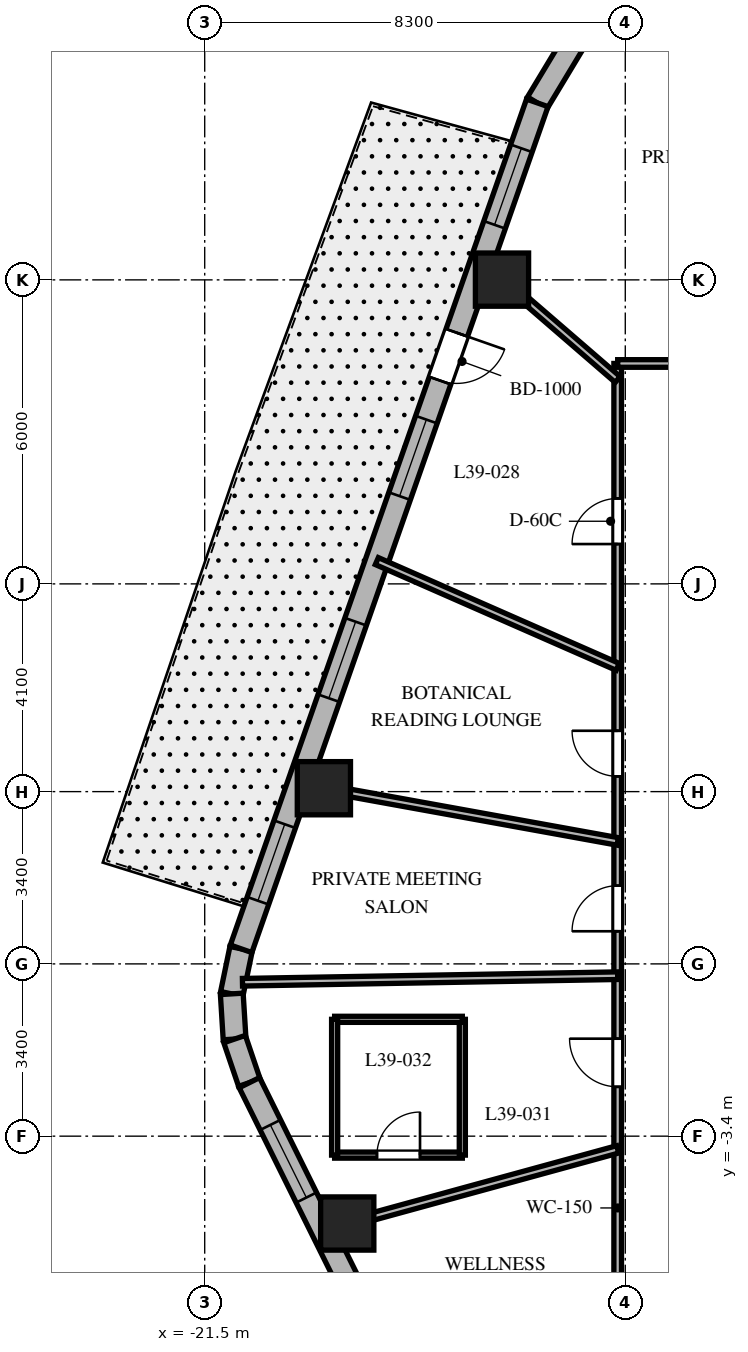
"""IFC4 building model, lengths in metres.
Left out: names, types, materials, properties, quantities, classifications, styles, units other than length and angle.
Written with IfcOpenShell. Run it as: python <this file> out.ifc"""

import sys

from ifc_helpers import new_model, si_unit, direction, frame, frame_2d, origin, origin_2d, place, context, subcontext, project, spatial, rectangle, extrude, element, fill, save


model = new_model("IFC4")
c1 = context("Model", 3, precision=1e-05, world=origin(), true_north=direction((0.0, 1.0)))
c2 = subcontext(c1, "Body", "Model", "MODEL_VIEW")
j1 = project(units=[si_unit("LENGTHUNIT", "METRE"), si_unit("PLANEANGLEUNIT", "RADIAN")], contexts=[c1])
p1 = place(None, origin())
s1 = spatial("IfcSite", under=j1, at=p1, CompositionType="ELEMENT")
p2 = place(p1, origin())
s2 = spatial("IfcBuilding", under=s1, at=p2, CompositionType="ELEMENT")
p3 = place(p2, frame((0.0, 0.0, 159.1)))
s3 = spatial("IfcBuildingStorey", under=s2, at=p3, CompositionType="ELEMENT", Elevation=159.1)
for number, where, z_axis, x_axis in (
    (1, (-15.633, 13.505, 0.0), (0.0, 0.0, 1.0), (1.0, 0.0, 0.0)),
    (2, (-19.148, 3.467, 0.0), (0.0, 0.0, 1.0), (1.0, 0.0, 0.0)),
    (3, (-18.687, -5.124, 0.0), (0.0, 0.0, 1.0), (1.0, 0.0, 0.0)),
):
    element("IfcColumn", number, at=place(p3, frame(where, z_axis=z_axis, x_axis=x_axis)), inside=s3, PredefinedType="COLUMN", context=c2, shape_type="SweptSolid", body=[
        extrude(rectangle(XDim=1.05, YDim=1.05, at=origin_2d()), origin(), (0.0, 0.0, 1.0), 3.7),
    ])
p4 = place(p3, frame((-14.214, 18.192, 0.0), z_axis=(0.0, 0.0, 1.0), x_axis=(-0.516340945502, -0.856383108193, 0.0)))
e4 = element("IfcWall", 4, at=p4, inside=s3, PredefinedType="SOLIDWALL", context=c2, shape_type="SweptSolid", body=[
    extrude(rectangle(XDim=1.4, YDim=0.45, at=frame_2d((0.7, 0.0))), origin(), (0.0, 0.0, 1.0), 3.4),
])
p5 = place(p3, frame((-20.782, 0.298, 0.0), z_axis=(0.0, 0.0, 1.0), x_axis=(-0.202570068411, -0.979267771033, 0.0)))
e5 = element("IfcWall", 5, at=p5, inside=s3, PredefinedType="SOLIDWALL", context=c2, shape_type="SweptSolid", body=[
    extrude(rectangle(XDim=0.909, YDim=0.45, at=frame_2d((0.454, 0.0))), origin(), (0.0, 0.0, 1.0), 3.4),
])
p6 = place(p3, frame((-20.966, -0.592, 0.0), z_axis=(0.0, 0.0, 1.0), x_axis=(0.061748898935, -0.998091715966, 0.0)))
e6 = element("IfcWall", 6, at=p6, inside=s3, PredefinedType="SOLIDWALL", context=c2, shape_type="SweptSolid", body=[
    extrude(rectangle(XDim=0.894, YDim=0.45, at=frame_2d((0.447, 0.0))), origin(), (0.0, 0.0, 1.0), 3.4),
])
p7 = place(p3, frame((-20.911, -1.484, 0.0), z_axis=(0.0, 0.0, 1.0), x_axis=(0.321623334353, -0.946867694453, 0.0)))
e7 = element("IfcWall", 7, at=p7, inside=s3, PredefinedType="SOLIDWALL", context=c2, shape_type="SweptSolid", body=[
    extrude(rectangle(XDim=0.909, YDim=0.45, at=frame_2d((0.454, 0.0))), origin(), (0.0, 0.0, 1.0), 3.4),
])
p8 = place(p3, frame((-14.937, 16.993, 0.0), z_axis=(0.0, 0.0, 1.0), x_axis=(-0.330431575061, -0.943829949834, 0.0)))
e8 = element("IfcWall", 8, at=p8, inside=s3, PredefinedType="SOLIDWALL", context=c2, shape_type="SweptSolid", body=[
    extrude(rectangle(XDim=17.689, YDim=0.45, at=frame_2d((8.844, 0.0))), origin(), (0.0, 0.0, 1.0), 3.4),
])
p9 = place(p8, frame((4.807, 0.0, 0.0)))
e9 = element("IfcOpeningElement", 9, at=p9, cuts=e8, PredefinedType="OPENING", context=c2, shape_type="SweptSolid", body=[
    extrude(rectangle(XDim=1.0, YDim=2.15, at=frame_2d((0.5, 1.075))), frame((0.0, 0.235, 0.0), z_axis=(0.0, -1.0, 0.0), x_axis=(1.0, 0.0, 0.0)), (0.0, 0.0, 1.0), 0.47),
])
p10 = place(p8, frame((0.95, 0.0, 0.8)))
e10 = element("IfcOpeningElement", 10, at=p10, cuts=e8, PredefinedType="OPENING", context=c2, shape_type="SweptSolid", body=[
    extrude(rectangle(XDim=1.6, YDim=1.75, at=frame_2d((0.8, 0.875))), frame((0.0, 0.235, 0.0), z_axis=(0.0, -1.0, 0.0), x_axis=(1.0, 0.0, 0.0)), (0.0, 0.0, 1.0), 0.47),
])
p11 = place(p8, frame((6.623, 0.0, 0.8)))
e11 = element("IfcOpeningElement", 11, at=p11, cuts=e8, PredefinedType="OPENING", context=c2, shape_type="SweptSolid", body=[
    extrude(rectangle(XDim=1.6, YDim=1.75, at=frame_2d((0.8, 0.875))), frame((0.0, 0.235, 0.0), z_axis=(0.0, -1.0, 0.0), x_axis=(1.0, 0.0, 0.0)), (0.0, 0.0, 1.0), 0.47),
])
p12 = place(p8, frame((10.849, 0.0, 0.8)))
e12 = element("IfcOpeningElement", 12, at=p12, cuts=e8, PredefinedType="OPENING", context=c2, shape_type="SweptSolid", body=[
    extrude(rectangle(XDim=1.6, YDim=1.75, at=frame_2d((0.8, 0.875))), frame((0.0, 0.235, 0.0), z_axis=(0.0, -1.0, 0.0), x_axis=(1.0, 0.0, 0.0)), (0.0, 0.0, 1.0), 0.47),
])
p13 = place(p8, frame((15.084, 0.0, 0.8)))
e13 = element("IfcOpeningElement", 13, at=p13, cuts=e8, PredefinedType="OPENING", context=c2, shape_type="SweptSolid", body=[
    extrude(rectangle(XDim=1.6, YDim=1.75, at=frame_2d((0.8, 0.875))), frame((0.0, 0.235, 0.0), z_axis=(0.0, -1.0, 0.0), x_axis=(1.0, 0.0, 0.0)), (0.0, 0.0, 1.0), 0.47),
])
p14 = place(p3, frame((-20.618, -2.344, 0.0), z_axis=(0.0, 0.0, 1.0), x_axis=(0.444243691097, -0.895905990002, 0.0)))
e14 = element("IfcWall", 14, at=p14, inside=s3, PredefinedType="SOLIDWALL", context=c2, shape_type="SweptSolid", body=[
    extrude(rectangle(XDim=16.784, YDim=0.45, at=frame_2d((8.392, 0.0))), origin(), (0.0, 0.0, 1.0), 3.4),
])
p15 = place(p14, frame((0.931, 0.0, 0.8)))
e15 = element("IfcOpeningElement", 15, at=p15, cuts=e14, PredefinedType="OPENING", context=c2, shape_type="SweptSolid", body=[
    extrude(rectangle(XDim=1.6, YDim=1.75, at=frame_2d((0.8, 0.875))), frame((0.0, 0.235, 0.0), z_axis=(0.0, -1.0, 0.0), x_axis=(1.0, 0.0, 0.0)), (0.0, 0.0, 1.0), 0.47),
])
p16 = place(p14, frame((7.642, 0.0, 0.8)))
e16 = element("IfcOpeningElement", 16, at=p16, cuts=e14, PredefinedType="OPENING", context=c2, shape_type="SweptSolid", body=[
    extrude(rectangle(XDim=1.6, YDim=1.75, at=frame_2d((0.8, 0.875))), frame((0.0, 0.235, 0.0), z_axis=(0.0, -1.0, 0.0), x_axis=(1.0, 0.0, 0.0)), (0.0, 0.0, 1.0), 0.47),
])
p17 = place(p14, frame((14.303, 0.0, 0.8)))
e17 = element("IfcOpeningElement", 17, at=p17, cuts=e14, PredefinedType="OPENING", context=c2, shape_type="SweptSolid", body=[
    extrude(rectangle(XDim=1.6, YDim=1.75, at=frame_2d((0.8, 0.875))), frame((0.0, 0.235, 0.0), z_axis=(0.0, -1.0, 0.0), x_axis=(1.0, 0.0, 0.0)), (0.0, 0.0, 1.0), 0.47),
])
p18 = place(p3, frame((-13.35, -11.85, 0.0), z_axis=(0.0, 0.0, 1.0), x_axis=(0.0, 1.0, 0.0)))
e18 = element("IfcWall", 18, at=p18, inside=s3, PredefinedType="PARTITIONING", context=c2, shape_type="SweptSolid", body=[
    extrude(rectangle(XDim=23.7, YDim=0.15, at=frame_2d((11.85, 0.0))), origin(), (0.0, 0.0, 1.0), 2.84),
])
p19 = place(p18, frame((20.136, 0.0, 0.0)))
e19 = element("IfcOpeningElement", 19, at=p19, cuts=e18, PredefinedType="OPENING", context=c2, shape_type="SweptSolid", body=[
    extrude(rectangle(XDim=0.9, YDim=2.03, at=frame_2d((0.45, 1.015))), frame((0.0, 0.085, 0.0), z_axis=(0.0, -1.0, 0.0), x_axis=(1.0, 0.0, 0.0)), (0.0, 0.0, 1.0), 0.17),
])
p20 = place(p18, frame((15.551, 0.0, 0.0)))
e20 = element("IfcOpeningElement", 20, at=p20, cuts=e18, PredefinedType="OPENING", context=c2, shape_type="SweptSolid", body=[
    extrude(rectangle(XDim=0.9, YDim=2.03, at=frame_2d((0.45, 1.015))), frame((0.0, 0.085, 0.0), z_axis=(0.0, -1.0, 0.0), x_axis=(1.0, 0.0, 0.0)), (0.0, 0.0, 1.0), 0.17),
])
p21 = place(p18, frame((12.494, 0.0, 0.0)))
e21 = element("IfcOpeningElement", 21, at=p21, cuts=e18, PredefinedType="OPENING", context=c2, shape_type="SweptSolid", body=[
    extrude(rectangle(XDim=0.9, YDim=2.03, at=frame_2d((0.45, 1.015))), frame((0.0, 0.085, 0.0), z_axis=(0.0, -1.0, 0.0), x_axis=(1.0, 0.0, 0.0)), (0.0, 0.0, 1.0), 0.17),
])
p22 = place(p18, frame((9.424, 0.0, 0.0)))
e22 = element("IfcOpeningElement", 22, at=p22, cuts=e18, PredefinedType="OPENING", context=c2, shape_type="SweptSolid", body=[
    extrude(rectangle(XDim=0.95, YDim=2.03, at=frame_2d((0.475, 1.015))), frame((0.0, 0.085, 0.0), z_axis=(0.0, -1.0, 0.0), x_axis=(1.0, 0.0, 0.0)), (0.0, 0.0, 1.0), 0.17),
])
p23 = place(p18, frame((3.765, 0.0, 0.0)))
e23 = element("IfcOpeningElement", 23, at=p23, cuts=e18, PredefinedType="OPENING", context=c2, shape_type="SweptSolid", body=[
    extrude(rectangle(XDim=0.9, YDim=2.03, at=frame_2d((0.45, 1.015))), frame((0.0, 0.085, 0.0), z_axis=(0.0, -1.0, 0.0), x_axis=(1.0, 0.0, 0.0)), (0.0, 0.0, 1.0), 0.17),
])
p24 = place(p3, frame((-13.35, 11.85, 0.0), z_axis=(0.0, 0.0, 1.0), x_axis=(1.0, 0.0, 0.0)))
e24 = element("IfcWall", 24, at=p24, inside=s3, PredefinedType="PARTITIONING", context=c2, shape_type="SweptSolid", body=[
    extrude(rectangle(XDim=26.7, YDim=0.15, at=frame_2d((13.35, 0.0))), origin(), (0.0, 0.0, 1.0), 2.84),
])
p25 = place(p24, frame((20.682, 0.0, 0.0)))
e25 = element("IfcOpeningElement", 25, at=p25, cuts=e24, PredefinedType="OPENING", context=c2, shape_type="SweptSolid", body=[
    extrude(rectangle(XDim=0.95, YDim=2.03, at=frame_2d((0.475, 1.015))), frame((0.0, 0.085, 0.0), z_axis=(0.0, -1.0, 0.0), x_axis=(1.0, 0.0, 0.0)), (0.0, 0.0, 1.0), 0.17),
])
p26 = place(p24, frame((14.708, 0.0, 0.0)))
e26 = element("IfcOpeningElement", 26, at=p26, cuts=e24, PredefinedType="OPENING", context=c2, shape_type="SweptSolid", body=[
    extrude(rectangle(XDim=0.95, YDim=2.03, at=frame_2d((0.475, 1.015))), frame((0.0, 0.085, 0.0), z_axis=(0.0, -1.0, 0.0), x_axis=(1.0, 0.0, 0.0)), (0.0, 0.0, 1.0), 0.17),
])
p27 = place(p24, frame((10.553, 0.0, 0.0)))
e27 = element("IfcOpeningElement", 27, at=p27, cuts=e24, PredefinedType="OPENING", context=c2, shape_type="SweptSolid", body=[
    extrude(rectangle(XDim=0.95, YDim=2.03, at=frame_2d((0.475, 1.015))), frame((0.0, 0.085, 0.0), z_axis=(0.0, -1.0, 0.0), x_axis=(1.0, 0.0, 0.0)), (0.0, 0.0, 1.0), 0.17),
])
p28 = place(p24, frame((3.995, 0.0, 0.0)))
e28 = element("IfcOpeningElement", 28, at=p28, cuts=e24, PredefinedType="OPENING", context=c2, shape_type="SweptSolid", body=[
    extrude(rectangle(XDim=0.95, YDim=2.03, at=frame_2d((0.475, 1.015))), frame((0.0, 0.085, 0.0), z_axis=(0.0, -1.0, 0.0), x_axis=(1.0, 0.0, 0.0)), (0.0, 0.0, 1.0), 0.17),
])
p29 = place(p3, frame((-13.35, 11.533, 0.0), z_axis=(0.0, 0.0, 1.0), x_axis=(-0.756711647314, 0.65374879183, 0.0)))
e29 = element("IfcWall", 29, at=p29, inside=s3, PredefinedType="PARTITIONING", context=c2, shape_type="SweptSolid", body=[
    extrude(rectangle(XDim=3.55, YDim=0.15, at=frame_2d((1.775, 0.0))), origin(), (0.0, 0.0, 1.0), 2.64),
])
p30 = place(p3, frame((-13.35, 5.863, 0.0), z_axis=(0.0, 0.0, 1.0), x_axis=(-0.9155832175, 0.402128551376, 0.0)))
e30 = element("IfcWall", 30, at=p30, inside=s3, PredefinedType="PARTITIONING", context=c2, shape_type="SweptSolid", body=[
    extrude(rectangle(XDim=5.191, YDim=0.15, at=frame_2d((2.595, 0.0))), origin(), (0.0, 0.0, 1.0), 2.64),
])
p31 = place(p3, frame((-13.35, 2.417, 0.0), z_axis=(0.0, 0.0, 1.0), x_axis=(-0.98399796473, 0.178179699761, 0.0)))
e31 = element("IfcWall", 31, at=p31, inside=s3, PredefinedType="PARTITIONING", context=c2, shape_type="SweptSolid", body=[
    extrude(rectangle(XDim=6.393, YDim=0.15, at=frame_2d((3.197, 0.0))), origin(), (0.0, 0.0, 1.0), 2.64),
])
p32 = place(p3, frame((-13.35, -0.233, 0.0), z_axis=(0.0, 0.0, 1.0), x_axis=(-0.999847932133, -0.017438824797, 0.0)))
e32 = element("IfcWall", 32, at=p32, inside=s3, PredefinedType="PARTITIONING", context=c2, shape_type="SweptSolid", body=[
    extrude(rectangle(XDim=7.406, YDim=0.15, at=frame_2d((3.703, 0.0))), origin(), (0.0, 0.0, 1.0), 2.64),
])
p33 = place(p3, frame((-13.35, -3.661, 0.0), z_axis=(0.0, 0.0, 1.0), x_axis=(-0.964397145454, -0.264458211898, 0.0)))
e33 = element("IfcWall", 33, at=p33, inside=s3, PredefinedType="PARTITIONING", context=c2, shape_type="SweptSolid", body=[
    extrude(rectangle(XDim=6.039, YDim=0.15, at=frame_2d((3.019, 0.0))), origin(), (0.0, 0.0, 1.0), 2.64),
])
p34 = place(p3, frame((-18.936, -3.774, 0.0), z_axis=(0.0, 0.0, 1.0), x_axis=(1.0, 0.0, 0.0)))
e34 = element("IfcWall", 34, at=p34, inside=s3, PredefinedType="PARTITIONING", context=c2, shape_type="SweptSolid", body=[
    extrude(rectangle(XDim=2.52, YDim=0.12, at=frame_2d((1.26, 0.0))), origin(), (0.0, 0.0, 1.0), 2.64),
])
p35 = place(p34, frame((0.835, 0.0, 0.0)))
e35 = element("IfcOpeningElement", 35, at=p35, cuts=e34, PredefinedType="OPENING", context=c2, shape_type="SweptSolid", body=[
    extrude(rectangle(XDim=0.85, YDim=2.03, at=frame_2d((0.425, 1.015))), frame((0.0, 0.07, 0.0), z_axis=(0.0, -1.0, 0.0), x_axis=(1.0, 0.0, 0.0)), (0.0, 0.0, 1.0), 0.14),
])
p36 = place(p3, frame((-16.416, -3.774, 0.0), z_axis=(0.0, 0.0, 1.0), x_axis=(0.0, 1.0, 0.0)))
e36 = element("IfcWall", 36, at=p36, inside=s3, PredefinedType="PARTITIONING", context=c2, shape_type="SweptSolid", body=[
    extrude(rectangle(XDim=2.68, YDim=0.12, at=frame_2d((1.34, 0.0))), origin(), (0.0, 0.0, 1.0), 3.4),
])
p37 = place(p3, frame((-16.416, -1.094, 0.0), z_axis=(0.0, 0.0, 1.0), x_axis=(-1.0, 0.0, 0.0)))
e37 = element("IfcWall", 37, at=p37, inside=s3, PredefinedType="PARTITIONING", context=c2, shape_type="SweptSolid", body=[
    extrude(rectangle(XDim=2.52, YDim=0.12, at=frame_2d((1.26, 0.0))), origin(), (0.0, 0.0, 1.0), 2.64),
])
p38 = place(p3, frame((-18.936, -1.094, 0.0), z_axis=(0.0, 0.0, 1.0), x_axis=(0.0, -1.0, 0.0)))
e38 = element("IfcWall", 38, at=p38, inside=s3, PredefinedType="PARTITIONING", context=c2, shape_type="SweptSolid", body=[
    extrude(rectangle(XDim=2.68, YDim=0.12, at=frame_2d((1.34, 0.0))), origin(), (0.0, 0.0, 1.0), 2.64),
])
p39 = place(p9, origin())
e39 = element("IfcDoor", 39, at=p39, inside=s3, OperationType="SINGLE_SWING_LEFT", PredefinedType="DOOR", context=c2, shape_type="SweptSolid", body=[
    extrude(rectangle(XDim=1.0, YDim=2.15, at=frame_2d((0.5, 1.075))), frame((0.0, 0.025, 0.0), z_axis=(0.0, -1.0, 0.0), x_axis=(1.0, 0.0, 0.0)), (0.0, 0.0, 1.0), 0.05),
])
fill(e9, e39)
p40 = place(p10, origin())
e40 = element("IfcWindow", 40, at=p40, inside=s3, PartitioningType="SINGLE_PANEL", PredefinedType="WINDOW", context=c2, shape_type="SweptSolid", body=[
    extrude(rectangle(XDim=1.6, YDim=1.75, at=frame_2d((0.8, 0.875))), frame((0.0, 0.03, 0.0), z_axis=(0.0, -1.0, 0.0), x_axis=(1.0, 0.0, 0.0)), (0.0, 0.0, 1.0), 0.06),
])
fill(e10, e40)
p41 = place(p11, origin())
e41 = element("IfcWindow", 41, at=p41, inside=s3, PartitioningType="SINGLE_PANEL", PredefinedType="WINDOW", context=c2, shape_type="SweptSolid", body=[
    extrude(rectangle(XDim=1.6, YDim=1.75, at=frame_2d((0.8, 0.875))), frame((0.0, 0.03, 0.0), z_axis=(0.0, -1.0, 0.0), x_axis=(1.0, 0.0, 0.0)), (0.0, 0.0, 1.0), 0.06),
])
fill(e11, e41)
p42 = place(p12, origin())
e42 = element("IfcWindow", 42, at=p42, inside=s3, PartitioningType="SINGLE_PANEL", PredefinedType="WINDOW", context=c2, shape_type="SweptSolid", body=[
    extrude(rectangle(XDim=1.6, YDim=1.75, at=frame_2d((0.8, 0.875))), frame((0.0, 0.03, 0.0), z_axis=(0.0, -1.0, 0.0), x_axis=(1.0, 0.0, 0.0)), (0.0, 0.0, 1.0), 0.06),
])
fill(e12, e42)
p43 = place(p13, origin())
e43 = element("IfcWindow", 43, at=p43, inside=s3, PartitioningType="SINGLE_PANEL", PredefinedType="WINDOW", context=c2, shape_type="SweptSolid", body=[
    extrude(rectangle(XDim=1.6, YDim=1.75, at=frame_2d((0.8, 0.875))), frame((0.0, 0.03, 0.0), z_axis=(0.0, -1.0, 0.0), x_axis=(1.0, 0.0, 0.0)), (0.0, 0.0, 1.0), 0.06),
])
fill(e13, e43)
p44 = place(p15, origin())
e44 = element("IfcWindow", 44, at=p44, inside=s3, PartitioningType="SINGLE_PANEL", PredefinedType="WINDOW", context=c2, shape_type="SweptSolid", body=[
    extrude(rectangle(XDim=1.6, YDim=1.75, at=frame_2d((0.8, 0.875))), frame((0.0, 0.03, 0.0), z_axis=(0.0, -1.0, 0.0), x_axis=(1.0, 0.0, 0.0)), (0.0, 0.0, 1.0), 0.06),
])
fill(e15, e44)
p45 = place(p19, origin())
e45 = element("IfcDoor", 45, at=p45, inside=s3, OperationType="SINGLE_SWING_LEFT", PredefinedType="DOOR", context=c2, shape_type="SweptSolid", body=[
    extrude(rectangle(XDim=0.9, YDim=2.03, at=frame_2d((0.45, 1.015))), frame((0.0, 0.025, 0.0), z_axis=(0.0, -1.0, 0.0), x_axis=(1.0, 0.0, 0.0)), (0.0, 0.0, 1.0), 0.05),
])
fill(e19, e45)
p46 = place(p20, origin())
e46 = element("IfcDoor", 46, at=p46, inside=s3, OperationType="SINGLE_SWING_RIGHT", PredefinedType="DOOR", context=c2, shape_type="SweptSolid", body=[
    extrude(rectangle(XDim=0.9, YDim=2.03, at=frame_2d((0.45, 1.015))), frame((0.0, 0.025, 0.0), z_axis=(0.0, -1.0, 0.0), x_axis=(1.0, 0.0, 0.0)), (0.0, 0.0, 1.0), 0.05),
])
fill(e20, e46)
p47 = place(p21, origin())
e47 = element("IfcDoor", 47, at=p47, inside=s3, OperationType="SINGLE_SWING_LEFT", PredefinedType="DOOR", context=c2, shape_type="SweptSolid", body=[
    extrude(rectangle(XDim=0.9, YDim=2.03, at=frame_2d((0.45, 1.015))), frame((0.0, 0.025, 0.0), z_axis=(0.0, -1.0, 0.0), x_axis=(1.0, 0.0, 0.0)), (0.0, 0.0, 1.0), 0.05),
])
fill(e21, e47)
p48 = place(p22, origin())
e48 = element("IfcDoor", 48, at=p48, inside=s3, OperationType="SINGLE_SWING_RIGHT", PredefinedType="DOOR", context=c2, shape_type="SweptSolid", body=[
    extrude(rectangle(XDim=0.95, YDim=2.03, at=frame_2d((0.475, 1.015))), frame((0.0, 0.025, 0.0), z_axis=(0.0, -1.0, 0.0), x_axis=(1.0, 0.0, 0.0)), (0.0, 0.0, 1.0), 0.05),
])
fill(e22, e48)
p49 = place(p35, origin())
e49 = element("IfcDoor", 49, at=p49, inside=s3, OperationType="SINGLE_SWING_RIGHT", PredefinedType="DOOR", context=c2, shape_type="SweptSolid", body=[
    extrude(rectangle(XDim=0.85, YDim=2.03, at=frame_2d((0.425, 1.015))), frame((0.0, 0.025, 0.0), z_axis=(0.0, -1.0, 0.0), x_axis=(1.0, 0.0, 0.0)), (0.0, 0.0, 1.0), 0.05),
])
fill(e35, e49)
save(model, sys.argv[1])
